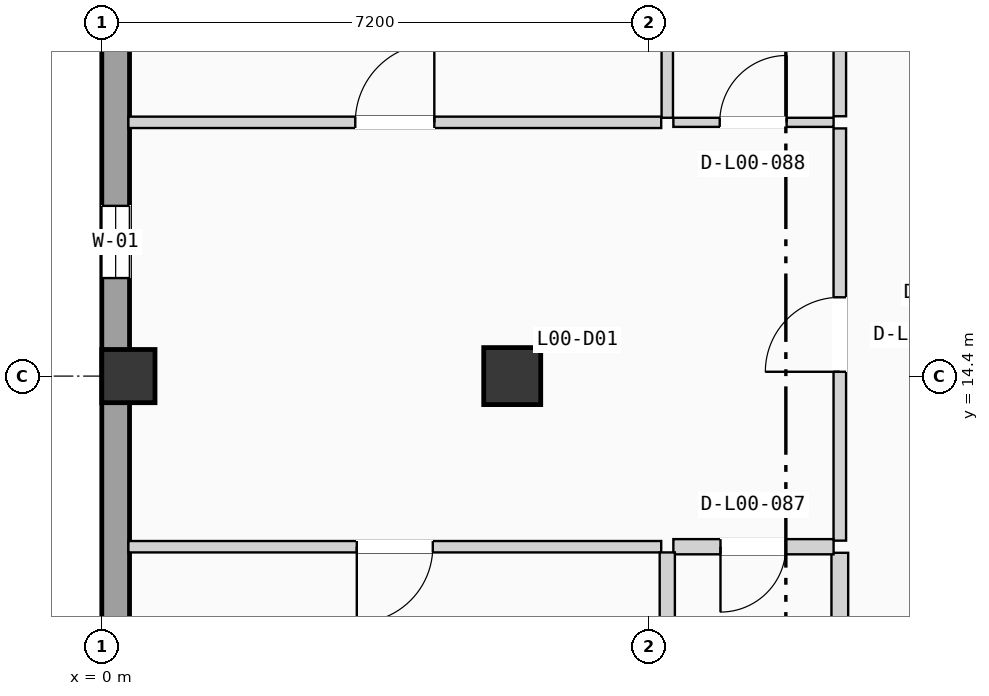
"""IFC4 building model, lengths in metres.
Left out: names, types, materials, properties, quantities, classifications, styles, units other than length and angle.
Written with IfcOpenShell. Run it as: python <this file> out.ifc"""

import sys

from ifc_helpers import new_model, si_unit, direction, frame, frame_2d, origin, origin_2d, place, context, subcontext, project, spatial, rectangle, extrude, element, fill, save


model = new_model("IFC4")
c1 = context("Model", 3, precision=1e-05, world=origin(), true_north=direction((0.0, 1.0)))
c2 = subcontext(c1, "Body", "Model", "MODEL_VIEW")
j1 = project(units=[si_unit("LENGTHUNIT", "METRE"), si_unit("PLANEANGLEUNIT", "RADIAN")], contexts=[c1])
p1 = place(None, origin())
s1 = spatial("IfcSite", under=j1, at=p1, CompositionType="ELEMENT")
p2 = place(p1, origin())
s2 = spatial("IfcBuilding", under=s1, at=p2, CompositionType="ELEMENT")
p3 = place(p2, origin())
s3 = spatial("IfcBuildingStorey", under=s2, at=p3, CompositionType="ELEMENT", Elevation=0.0)
p4 = place(p3, frame((0.35, 14.4, 0.0), z_axis=(0.0, 0.0, 1.0), x_axis=(1.0, 0.0, 0.0)))
e1 = element("IfcColumn", 1, at=p4, inside=s3, PredefinedType="COLUMN", context=c2, shape_type="SweptSolid", body=[
    extrude(rectangle(XDim=0.7, YDim=0.7, at=origin_2d()), origin(), (0.0, 0.0, 1.0), 4.9),
])
p5 = place(p3, frame((5.4, 14.4, 0.0), z_axis=(0.0, 0.0, 1.0), x_axis=(1.0, 0.0, 0.0)))
e2 = element("IfcColumn", 2, at=p5, inside=s3, PredefinedType="COLUMN", context=c2, shape_type="SweptSolid", body=[
    extrude(rectangle(XDim=0.75, YDim=0.75, at=origin_2d()), origin(), (0.0, 0.0, 1.0), 4.9),
])
p6 = place(p3, frame((0.183, 0.365, 0.0), z_axis=(0.0, 0.0, 1.0), x_axis=(0.0, 1.0, 0.0)))
e3 = element("IfcWall", 3, at=p6, inside=s3, PredefinedType="SOLIDWALL", context=c2, shape_type="SweptSolid", body=[
    extrude(rectangle(XDim=49.67, YDim=0.365, at=frame_2d((24.835, 0.0))), origin(), (0.0, 0.0, 1.0), 4.64),
])
p7 = place(p6, frame((15.325, 0.0, 0.9)))
e4 = element("IfcOpeningElement", 4, at=p7, cuts=e3, PredefinedType="OPENING", context=c2, shape_type="SweptSolid", body=[
    extrude(rectangle(XDim=0.95, YDim=1.2, at=frame_2d((0.475, 0.6))), frame((0.0, 0.192, 0.0), z_axis=(0.0, -1.0, 0.0), x_axis=(1.0, 0.0, 0.0)), (0.0, 0.0, 1.0), 0.385),
])
p8 = place(p6, frame((8.997, 0.0, 0.9)))
e5 = element("IfcOpeningElement", 5, at=p8, cuts=e3, PredefinedType="OPENING", context=c2, shape_type="SweptSolid", body=[
    extrude(rectangle(XDim=0.95, YDim=1.35, at=frame_2d((0.475, 0.675))), frame((0.0, 0.192, 0.0), z_axis=(0.0, -1.0, 0.0), x_axis=(1.0, 0.0, 0.0)), (0.0, 0.0, 1.0), 0.385),
])
p9 = place(p6, frame((18.735, 0.0, 0.9)))
e6 = element("IfcOpeningElement", 6, at=p9, cuts=e3, PredefinedType="OPENING", context=c2, shape_type="SweptSolid", body=[
    extrude(rectangle(XDim=0.95, YDim=1.5, at=frame_2d((0.475, 0.75))), frame((0.0, 0.192, 0.0), z_axis=(0.0, -1.0, 0.0), x_axis=(1.0, 0.0, 0.0)), (0.0, 0.0, 1.0), 0.385),
])
p10 = place(p6, frame((31.56, 0.0, 0.9)))
e7 = element("IfcOpeningElement", 7, at=p10, cuts=e3, PredefinedType="OPENING", context=c2, shape_type="SweptSolid", body=[
    extrude(rectangle(XDim=0.95, YDim=1.65, at=frame_2d((0.475, 0.825))), frame((0.0, 0.192, 0.0), z_axis=(0.0, -1.0, 0.0), x_axis=(1.0, 0.0, 0.0)), (0.0, 0.0, 1.0), 0.385),
])
p11 = place(p6, frame((24.662, 0.0, 0.9)))
e8 = element("IfcOpeningElement", 8, at=p11, cuts=e3, PredefinedType="OPENING", context=c2, shape_type="SweptSolid", body=[
    extrude(rectangle(XDim=0.95, YDim=1.8, at=frame_2d((0.475, 0.9))), frame((0.0, 0.192, 0.0), z_axis=(0.0, -1.0, 0.0), x_axis=(1.0, 0.0, 0.0)), (0.0, 0.0, 1.0), 0.385),
])
p12 = place(p6, frame((38.645, 0.0, 0.9)))
e9 = element("IfcOpeningElement", 9, at=p12, cuts=e3, PredefinedType="OPENING", context=c2, shape_type="SweptSolid", body=[
    extrude(rectangle(XDim=1.05, YDim=1.2, at=frame_2d((0.525, 0.6))), frame((0.0, 0.192, 0.0), z_axis=(0.0, -1.0, 0.0), x_axis=(1.0, 0.0, 0.0)), (0.0, 0.0, 1.0), 0.385),
])
p13 = place(p3, frame((9.71, 12.235, 0.0), z_axis=(0.0, 0.0, 1.0), x_axis=(0.0, 1.0, 0.0)))
e10 = element("IfcWall", 10, at=p13, inside=s3, PredefinedType="PARTITIONING", context=c2, shape_type="SweptSolid", body=[
    extrude(rectangle(XDim=5.424, YDim=0.165, at=frame_2d((2.712, 0.0))), origin(), (0.0, 0.0, 1.0), 3.84),
])
p14 = place(p13, frame((2.222, 0.0, 0.0)))
e11 = element("IfcOpeningElement", 11, at=p14, cuts=e10, PredefinedType="OPENING", context=c2, shape_type="SweptSolid", body=[
    extrude(rectangle(XDim=0.98, YDim=2.08, at=frame_2d((0.49, 1.04))), frame((0.0, 0.093, 0.0), z_axis=(0.0, -1.0, 0.0), x_axis=(1.0, 0.0, 0.0)), (0.0, 0.0, 1.0), 0.185),
])
p15 = place(p3, frame((9.71, 7.6, 0.0), z_axis=(0.0, 0.0, 1.0), x_axis=(0.0, 1.0, 0.0)))
e12 = element("IfcWall", 12, at=p15, inside=s3, PredefinedType="PLUMBINGWALL", context=c2, shape_type="SweptSolid", body=[
    extrude(rectangle(XDim=4.475, YDim=0.22, at=frame_2d((2.237, 0.0))), origin(), (0.0, 0.0, 1.0), 3.84),
])
p16 = place(p3, frame((9.71, 17.819, 0.0), z_axis=(0.0, 0.0, 1.0), x_axis=(0.0, 1.0, 0.0)))
e13 = element("IfcWall", 13, at=p16, inside=s3, PredefinedType="PARTITIONING", context=c2, shape_type="SweptSolid", body=[
    extrude(rectangle(XDim=4.475, YDim=0.165, at=frame_2d((2.237, 0.0))), origin(), (0.0, 0.0, 1.0), 3.84),
])
p17 = place(p3, frame((7.52, 12.155, 0.0), z_axis=(0.0, 0.0, 1.0), x_axis=(1.0, 0.0, 0.0)))
e14 = element("IfcWall", 14, at=p17, inside=s3, PredefinedType="PLUMBINGWALL", context=c2, shape_type="SweptSolid", body=[
    extrude(rectangle(XDim=2.108, YDim=0.2, at=frame_2d((1.054, 0.0))), origin(), (0.0, 0.0, 1.0), 3.84),
])
p18 = place(p17, frame((0.62, 0.0, 0.0)))
e15 = element("IfcOpeningElement", 15, at=p18, cuts=e14, PredefinedType="OPENING", context=c2, shape_type="SweptSolid", body=[
    extrude(rectangle(XDim=0.86, YDim=2.0, at=frame_2d((0.43, 1.0))), frame((0.0, 0.11, 0.0), z_axis=(0.0, -1.0, 0.0), x_axis=(1.0, 0.0, 0.0)), (0.0, 0.0, 1.0), 0.22),
])
p19 = place(p3, frame((7.52, 17.739, 0.0), z_axis=(0.0, 0.0, 1.0), x_axis=(1.0, 0.0, 0.0)))
e16 = element("IfcWall", 16, at=p19, inside=s3, PredefinedType="PARTITIONING", context=c2, shape_type="SweptSolid", body=[
    extrude(rectangle(XDim=2.108, YDim=0.12, at=frame_2d((1.054, 0.0))), origin(), (0.0, 0.0, 1.0), 3.84),
])
p20 = place(p19, frame((0.61, 0.0, 0.0)))
e17 = element("IfcOpeningElement", 17, at=p20, cuts=e16, PredefinedType="OPENING", context=c2, shape_type="SweptSolid", body=[
    extrude(rectangle(XDim=0.88, YDim=2.02, at=frame_2d((0.44, 1.01))), frame((0.0, 0.07, 0.0), z_axis=(0.0, -1.0, 0.0), x_axis=(1.0, 0.0, 0.0)), (0.0, 0.0, 1.0), 0.14),
])
p21 = place(p3, frame((0.35, 12.155, 0.0), z_axis=(0.0, 0.0, 1.0), x_axis=(1.0, 0.0, 0.0)))
e18 = element("IfcWall", 18, at=p21, inside=s3, PredefinedType="PARTITIONING", context=c2, shape_type="SweptSolid", body=[
    extrude(rectangle(XDim=7.01, YDim=0.15, at=frame_2d((3.505, 0.0))), origin(), (0.0, 0.0, 1.0), 3.84),
])
p22 = place(p21, frame((3.005, 0.0, 0.0)))
e19 = element("IfcOpeningElement", 19, at=p22, cuts=e18, PredefinedType="OPENING", context=c2, shape_type="SweptSolid", body=[
    extrude(rectangle(XDim=1.0, YDim=2.06, at=frame_2d((0.5, 1.03))), frame((0.0, 0.085, 0.0), z_axis=(0.0, -1.0, 0.0), x_axis=(1.0, 0.0, 0.0)), (0.0, 0.0, 1.0), 0.17),
])
p23 = place(p3, frame((0.35, 17.739, 0.0), z_axis=(0.0, 0.0, 1.0), x_axis=(1.0, 0.0, 0.0)))
e20 = element("IfcWall", 20, at=p23, inside=s3, PredefinedType="PARTITIONING", context=c2, shape_type="SweptSolid", body=[
    extrude(rectangle(XDim=7.01, YDim=0.15, at=frame_2d((3.505, 0.0))), origin(), (0.0, 0.0, 1.0), 3.84),
])
p24 = place(p23, frame((2.985, 0.0, 0.0)))
e21 = element("IfcOpeningElement", 21, at=p24, cuts=e20, PredefinedType="OPENING", context=c2, shape_type="SweptSolid", body=[
    extrude(rectangle(XDim=1.04, YDim=2.08, at=frame_2d((0.52, 1.04))), frame((0.0, 0.085, 0.0), z_axis=(0.0, -1.0, 0.0), x_axis=(1.0, 0.0, 0.0)), (0.0, 0.0, 1.0), 0.17),
])
p25 = place(p3, frame((7.44, 7.6, 0.0), z_axis=(0.0, 0.0, 1.0), x_axis=(0.0, 1.0, 0.0)))
e22 = element("IfcWall", 22, at=p25, inside=s3, PredefinedType="PLUMBINGWALL", context=c2, shape_type="SweptSolid", body=[
    extrude(rectangle(XDim=4.48, YDim=0.2, at=frame_2d((2.24, 0.0))), origin(), (0.0, 0.0, 1.0), 3.84),
])
p26 = place(p3, frame((7.44, 17.799, 0.0), z_axis=(0.0, 0.0, 1.0), x_axis=(0.0, 1.0, 0.0)))
e23 = element("IfcWall", 23, at=p26, inside=s3, PredefinedType="PARTITIONING", context=c2, shape_type="SweptSolid", body=[
    extrude(rectangle(XDim=4.495, YDim=0.15, at=frame_2d((2.248, 0.0))), origin(), (0.0, 0.0, 1.0), 3.84),
])
p27 = place(p7, origin())
e24 = element("IfcWindow", 24, at=p27, inside=s3, PartitioningType="SINGLE_PANEL", PredefinedType="WINDOW", context=c2, shape_type="SweptSolid", body=[
    extrude(rectangle(XDim=0.95, YDim=1.2, at=frame_2d((0.475, 0.6))), frame((0.0, 0.03, 0.0), z_axis=(0.0, -1.0, 0.0), x_axis=(1.0, 0.0, 0.0)), (0.0, 0.0, 1.0), 0.06),
])
fill(e4, e24)
p28 = place(p14, origin())
e25 = element("IfcDoor", 25, at=p28, inside=s3, OperationType="SINGLE_SWING_LEFT", PredefinedType="DOOR", context=c2, shape_type="SweptSolid", body=[
    extrude(rectangle(XDim=0.98, YDim=2.08, at=frame_2d((0.49, 1.04))), frame((0.0, 0.025, 0.0), z_axis=(0.0, -1.0, 0.0), x_axis=(1.0, 0.0, 0.0)), (0.0, 0.0, 1.0), 0.05),
])
fill(e11, e25)
p29 = place(p18, frame((0.86, 0.0, 0.0), z_axis=(0.0, 0.0, 1.0), x_axis=(-1.0, 0.0, 0.0)))
e26 = element("IfcDoor", 26, at=p29, inside=s3, OperationType="SINGLE_SWING_LEFT", PredefinedType="DOOR", context=c2, shape_type="SweptSolid", body=[
    extrude(rectangle(XDim=0.86, YDim=2.0, at=frame_2d((0.43, 1.0))), frame((0.0, 0.025, 0.0), z_axis=(0.0, -1.0, 0.0), x_axis=(1.0, 0.0, 0.0)), (0.0, 0.0, 1.0), 0.05),
])
fill(e15, e26)
p30 = place(p20, origin())
e27 = element("IfcDoor", 27, at=p30, inside=s3, OperationType="SINGLE_SWING_RIGHT", PredefinedType="DOOR", context=c2, shape_type="SweptSolid", body=[
    extrude(rectangle(XDim=0.88, YDim=2.02, at=frame_2d((0.44, 1.01))), frame((0.0, 0.025, 0.0), z_axis=(0.0, -1.0, 0.0), x_axis=(1.0, 0.0, 0.0)), (0.0, 0.0, 1.0), 0.05),
])
fill(e17, e27)
p31 = place(p22, frame((1.0, 0.0, 0.0), z_axis=(0.0, 0.0, 1.0), x_axis=(-1.0, 0.0, 0.0)))
e28 = element("IfcDoor", 28, at=p31, inside=s3, OperationType="SINGLE_SWING_LEFT", PredefinedType="DOOR", context=c2, shape_type="SweptSolid", body=[
    extrude(rectangle(XDim=1.0, YDim=2.06, at=frame_2d((0.5, 1.03))), frame((0.0, 0.025, 0.0), z_axis=(0.0, -1.0, 0.0), x_axis=(1.0, 0.0, 0.0)), (0.0, 0.0, 1.0), 0.05),
])
fill(e19, e28)
p32 = place(p24, origin())
e29 = element("IfcDoor", 29, at=p32, inside=s3, OperationType="SINGLE_SWING_RIGHT", PredefinedType="DOOR", context=c2, shape_type="SweptSolid", body=[
    extrude(rectangle(XDim=1.04, YDim=2.08, at=frame_2d((0.52, 1.04))), frame((0.0, 0.025, 0.0), z_axis=(0.0, -1.0, 0.0), x_axis=(1.0, 0.0, 0.0)), (0.0, 0.0, 1.0), 0.05),
])
fill(e21, e29)
save(model, sys.argv[1])
